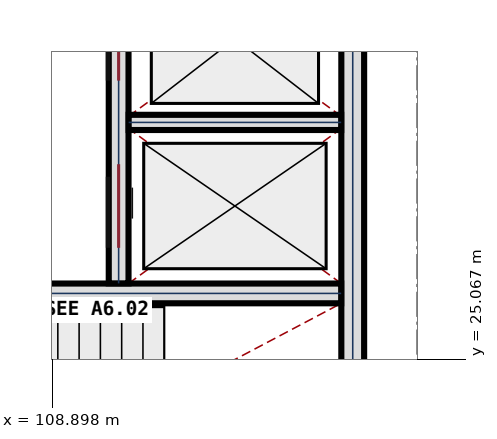
"""IFC4 building model, lengths in metres.
Left out: names, types, materials, properties, quantities, classifications, styles, units other than length and angle.
Written with IfcOpenShell. Run it as: python <this file> out.ifc"""

import sys

from ifc_helpers import new_model, si_unit, direction, frame, frame_2d, origin, place, context, subcontext, project, spatial, rectangle, extrude, element, fill, save


model = new_model("IFC4")
c1 = context("Model", 3, precision=1e-05, world=origin(), true_north=direction((0.0, 1.0)))
c2 = subcontext(c1, "Body", "Model", "MODEL_VIEW")
j1 = project(units=[si_unit("LENGTHUNIT", "METRE"), si_unit("PLANEANGLEUNIT", "RADIAN")], contexts=[c1])
p1 = place(None, origin())
s1 = spatial("IfcSite", under=j1, at=p1, CompositionType="ELEMENT")
p2 = place(p1, origin())
s2 = spatial("IfcBuilding", under=s1, at=p2, CompositionType="ELEMENT")
p3 = place(p2, origin())
s3 = spatial("IfcBuildingStorey", under=s2, at=p3, CompositionType="ELEMENT", Elevation=0.0)
p4 = place(p3, frame((112.85, 30.298, 0.0), z_axis=(0.0, 0.0, 1.0), x_axis=(0.0, -1.0, 0.0)))
e1 = element("IfcWall", 1, at=p4, inside=s3, PredefinedType="SHEAR", context=c2, shape_type="SweptSolid", body=[
    extrude(rectangle(XDim=7.796, YDim=0.3, at=frame_2d((3.898, 0.0))), origin(), (0.0, 0.0, 1.0), 5.4),
])
p5 = place(p3, frame((103.502, 25.93, 0.0), z_axis=(0.0, 0.0, 1.0), x_axis=(1.0, 0.0, 0.0)))
e2 = element("IfcWall", 2, at=p5, inside=s3, PredefinedType="SHEAR", context=c2, shape_type="SweptSolid", body=[
    extrude(rectangle(XDim=9.196, YDim=0.26, at=frame_2d((4.598, 0.0))), origin(), (0.0, 0.0, 1.0), 5.4),
])
p6 = place(p5, frame((1.598, 0.0, 0.0)))
e3 = element("IfcOpeningElement", 3, at=p6, cuts=e2, PredefinedType="OPENING", context=c2, shape_type="SweptSolid", body=[
    extrude(rectangle(XDim=1.2, YDim=2.2, at=frame_2d((0.6, 1.1))), frame((0.0, 0.14, 0.0), z_axis=(0.0, -1.0, 0.0), x_axis=(1.0, 0.0, 0.0)), (0.0, 0.0, 1.0), 0.28),
])
p7 = place(p5, frame((0.143, 0.0, 0.0)))
e4 = element("IfcOpeningElement", 4, at=p7, cuts=e2, PredefinedType="OPENING", context=c2, shape_type="SweptSolid", body=[
    extrude(rectangle(XDim=0.85, YDim=2.05, at=frame_2d((0.425, 1.025))), frame((0.0, 0.14, 0.0), z_axis=(0.0, -1.0, 0.0), x_axis=(1.0, 0.0, 0.0)), (0.0, 0.0, 1.0), 0.28),
])
p8 = place(p3, frame((109.77, 26.062, 0.0), z_axis=(0.0, 0.0, 1.0), x_axis=(0.0, 1.0, 0.0)))
e5 = element("IfcWall", 5, at=p8, inside=s3, PredefinedType="SHEAR", context=c2, shape_type="SweptSolid", body=[
    extrude(rectangle(XDim=4.236, YDim=0.26, at=frame_2d((2.118, 0.0))), origin(), (0.0, 0.0, 1.0), 5.4),
])
p9 = place(p8, frame((0.468, 0.0, 0.0)))
e6 = element("IfcOpeningElement", 6, at=p9, cuts=e5, PredefinedType="OPENING", context=c2, shape_type="SweptSolid", body=[
    extrude(rectangle(XDim=1.1, YDim=2.15, at=frame_2d((0.55, 1.075))), frame((0.0, 0.14, 0.0), z_axis=(0.0, -1.0, 0.0), x_axis=(1.0, 0.0, 0.0)), (0.0, 0.0, 1.0), 0.28),
])
p10 = place(p8, frame((2.668, 0.0, 0.0)))
e7 = element("IfcOpeningElement", 7, at=p10, cuts=e5, PredefinedType="OPENING", context=c2, shape_type="SweptSolid", body=[
    extrude(rectangle(XDim=1.1, YDim=2.15, at=frame_2d((0.55, 1.075))), frame((0.0, 0.14, 0.0), z_axis=(0.0, -1.0, 0.0), x_axis=(1.0, 0.0, 0.0)), (0.0, 0.0, 1.0), 0.28),
])
p11 = place(p3, frame((109.902, 28.18, 0.0), z_axis=(0.0, 0.0, 1.0), x_axis=(1.0, 0.0, 0.0)))
e8 = element("IfcWall", 8, at=p11, inside=s3, PredefinedType="PLUMBINGWALL", context=c2, shape_type="SweptSolid", body=[
    extrude(rectangle(XDim=2.796, YDim=0.2, at=frame_2d((1.398, 0.0))), origin(), (0.0, 0.0, 1.0), 5.08),
])
p12 = place(p9, origin())
e9 = element("IfcDoor", 9, at=p12, inside=s3, OperationType="SLIDING_TO_LEFT", PredefinedType="DOOR", context=c2, shape_type="SweptSolid", body=[
    extrude(rectangle(XDim=1.1, YDim=2.15, at=frame_2d((0.55, 1.075))), frame((0.0, 0.032, 0.0), z_axis=(0.0, -1.0, 0.0), x_axis=(1.0, 0.0, 0.0)), (0.0, 0.0, 1.0), 0.065),
])
fill(e6, e9)
p13 = place(p10, origin())
e10 = element("IfcDoor", 10, at=p13, inside=s3, OperationType="SLIDING_TO_LEFT", PredefinedType="DOOR", context=c2, shape_type="SweptSolid", body=[
    extrude(rectangle(XDim=1.1, YDim=2.15, at=frame_2d((0.55, 1.075))), frame((0.0, 0.032, 0.0), z_axis=(0.0, -1.0, 0.0), x_axis=(1.0, 0.0, 0.0)), (0.0, 0.0, 1.0), 0.065),
])
fill(e7, e10)
save(model, sys.argv[1])
